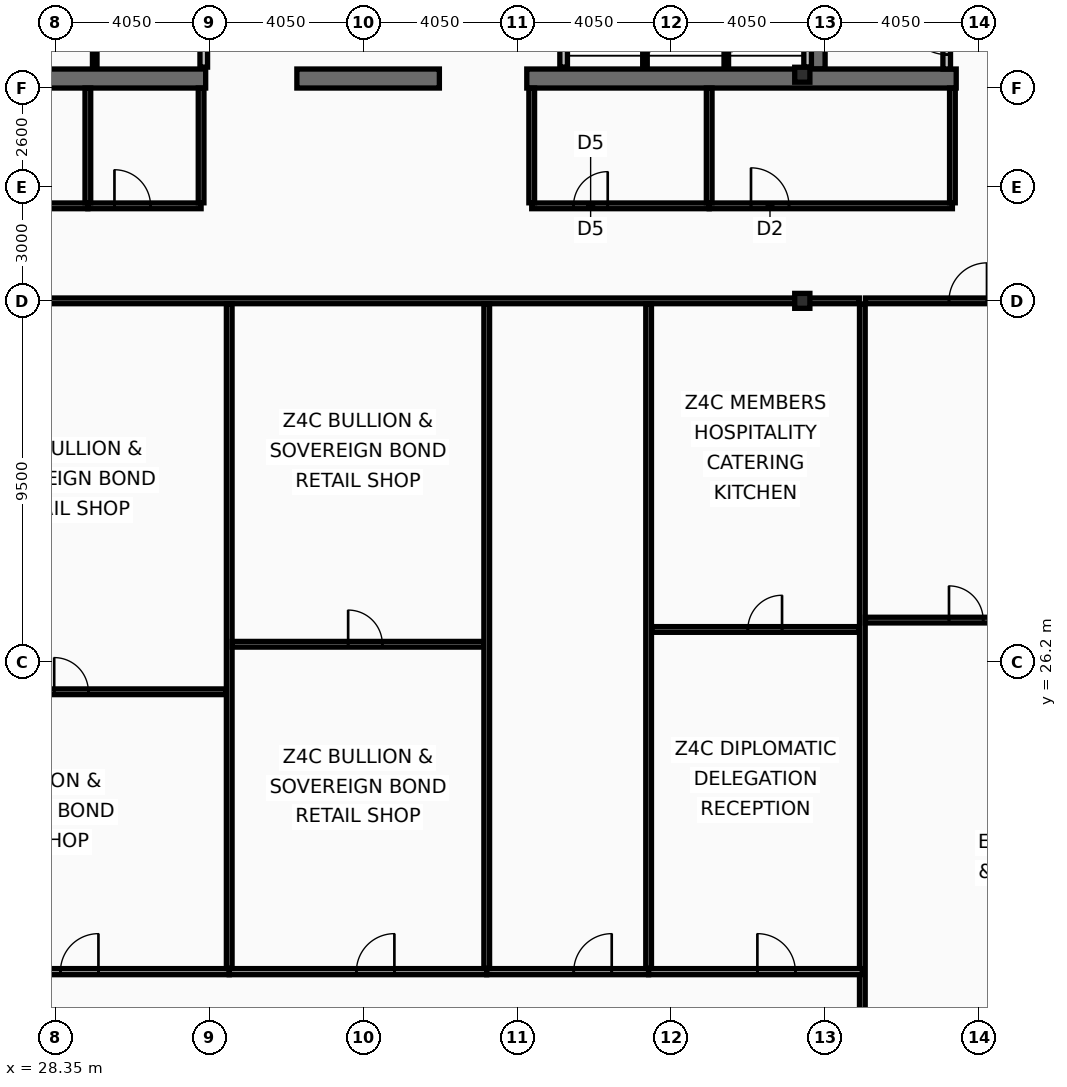
"""IFC4 building model, lengths in metres.
Left out: names, types, materials, properties, quantities, classifications, styles, units other than length and angle.
Written with IfcOpenShell. Run it as: python <this file> out.ifc"""

import sys

from ifc_helpers import new_model, si_unit, direction, frame, frame_2d, origin, origin_2d, place, context, subcontext, project, spatial, rectangle, i_section, extrude, element, fill, save


model = new_model("IFC4")
c1 = context("Model", 3, precision=1e-05, world=origin(), true_north=direction((0.0, 1.0)))
c2 = subcontext(c1, "Body", "Model", "MODEL_VIEW")
j1 = project(units=[si_unit("LENGTHUNIT", "METRE"), si_unit("PLANEANGLEUNIT", "RADIAN")], contexts=[c1])
p1 = place(None, origin())
s1 = spatial("IfcSite", under=j1, at=p1, CompositionType="ELEMENT")
p2 = place(p1, origin())
s2 = spatial("IfcBuilding", under=s1, at=p2, CompositionType="ELEMENT")
p3 = place(p2, frame((0.0, 0.0, 343.4)))
s3 = spatial("IfcBuildingStorey", under=s2, at=p3, CompositionType="ELEMENT", Elevation=343.4)
p4 = place(p3, frame((48.4, 41.8, 0.0), z_axis=(0.0, 0.0, 1.0), x_axis=(0.0, 1.0, 0.0)))
e1 = element("IfcWall", 1, at=p4, inside=s3, PredefinedType="SHEAR", context=c2, shape_type="SweptSolid", body=[
    extrude(rectangle(XDim=11.4, YDim=0.4, at=frame_2d((5.7, 0.0))), origin(), (0.0, 0.0, 1.0), 3.44),
])
p5 = place(p3, frame((32.3, 41.55, 0.0), z_axis=(0.0, 0.0, 1.0), x_axis=(-1.0, 0.0, 0.0)))
e2 = element("IfcWall", 2, at=p5, inside=s3, PredefinedType="SHEAR", context=c2, shape_type="SweptSolid", body=[
    extrude(rectangle(XDim=11.45, YDim=0.5, at=frame_2d((5.725, 0.0))), origin(), (0.0, 0.0, 1.0), 3.44),
])
p6 = place(p3, frame((38.45, 41.55, 0.0), z_axis=(0.0, 0.0, 1.0), x_axis=(-1.0, 0.0, 0.0)))
e3 = element("IfcWall", 3, at=p6, inside=s3, PredefinedType="SHEAR", context=c2, shape_type="SweptSolid", body=[
    extrude(rectangle(XDim=3.75, YDim=0.5, at=frame_2d((1.875, 0.0))), origin(), (0.0, 0.0, 1.0), 3.44),
])
p7 = place(p3, frame((52.05, 41.55, 0.0), z_axis=(0.0, 0.0, 1.0), x_axis=(-1.0, 0.0, 0.0)))
e4 = element("IfcWall", 4, at=p7, inside=s3, PredefinedType="SHEAR", context=c2, shape_type="SweptSolid", body=[
    extrude(rectangle(XDim=11.3, YDim=0.5, at=frame_2d((5.65, 0.0))), origin(), (0.0, 0.0, 1.0), 3.44),
])
for number, where, z_axis, x_axis in (
    (5, (48.0, 35.7, 0.0), (0.0, 0.0, 1.0), (1.0, 0.0, 0.0)),
    (6, (48.0, 41.65, 0.0), (0.0, 0.0, 1.0), (1.0, 0.0, 0.0)),
):
    element("IfcColumn", number, at=place(p3, frame(where, z_axis=z_axis, x_axis=x_axis)), inside=s3, PredefinedType="COLUMN", context=c2, shape_type="SweptSolid", body=[
        extrude(i_section(OverallWidth=0.399, OverallDepth=0.393, WebThickness=0.023, FlangeThickness=0.037, at=origin_2d()), origin(), (0.0, 0.0, 1.0), 3.6),
    ])
p8 = place(p3, frame((51.8, 41.8, 0.0), z_axis=(0.0, 0.0, 1.0), x_axis=(0.0, 1.0, 0.0)))
e7 = element("IfcWall", 7, at=p8, inside=s3, PredefinedType="PARTITIONING", context=c2, shape_type="SweptSolid", body=[
    extrude(rectangle(XDim=2.695, YDim=0.2, at=frame_2d((1.348, 0.0))), origin(), (0.0, 0.0, 1.0), 3.44),
])
p9 = place(p8, frame((0.38, 0.0, 0.0)))
e8 = element("IfcOpeningElement", 8, at=p9, cuts=e7, PredefinedType="OPENING", context=c2, shape_type="SweptSolid", body=[
    extrude(rectangle(XDim=1.05, YDim=2.15, at=frame_2d((0.525, 1.075))), frame((0.0, 0.11, 0.0), z_axis=(0.0, -1.0, 0.0), x_axis=(1.0, 0.0, 0.0)), (0.0, 0.0, 1.0), 0.22),
])
p10 = place(p3, frame((32.25, 41.85, 0.0), z_axis=(0.0, 0.0, 1.0), x_axis=(0.0, 1.0, 0.0)))
e9 = element("IfcWall", 9, at=p10, inside=s3, PredefinedType="PARTITIONING", context=c2, shape_type="SweptSolid", body=[
    extrude(rectangle(XDim=2.395, YDim=0.2, at=frame_2d((1.198, 0.0))), origin(), (0.0, 0.0, 1.0), 3.44),
])
p11 = place(p3, frame((29.381, 41.85, 0.0), z_axis=(0.0, 0.0, 1.0), x_axis=(0.0, 1.0, 0.0)))
e10 = element("IfcWall", 10, at=p11, inside=s3, PredefinedType="PARTITIONING", context=c2, shape_type="SweptSolid", body=[
    extrude(rectangle(XDim=2.395, YDim=0.12, at=frame_2d((1.198, 0.0))), origin(), (0.0, 0.0, 1.0), 3.44),
])
for number, where, z_axis, x_axis in (
    (11, (41.72, 41.85, 0.0), (0.0, 0.0, 1.0), (0.0, 1.0, 0.0)),
    (12, (48.14, 41.85, 0.0), (0.0, 0.0, 1.0), (0.0, 1.0, 0.0)),
):
    element("IfcWall", number, at=place(p3, frame(where, z_axis=z_axis, x_axis=x_axis)), inside=s3, PredefinedType="PARTITIONING", context=c2, shape_type="SweptSolid", body=[
        extrude(rectangle(XDim=2.4, YDim=0.2, at=frame_2d((1.2, 0.0))), origin(), (0.0, 0.0, 1.0), 3.44),
    ])
for number, where, z_axis, x_axis in (
    (13, (43.86, 41.85, 0.0), (0.0, 0.0, 1.0), (0.0, 1.0, 0.0)),
    (14, (46.0, 41.85, 0.0), (0.0, 0.0, 1.0), (0.0, 1.0, 0.0)),
):
    element("IfcWall", number, at=place(p3, frame(where, z_axis=z_axis, x_axis=x_axis)), inside=s3, PredefinedType="PARTITIONING", context=c2, shape_type="SweptSolid", body=[
        extrude(rectangle(XDim=2.4, YDim=0.12, at=frame_2d((1.2, 0.0))), origin(), (0.0, 0.0, 1.0), 3.44),
    ])
p12 = place(p3, frame((24.7, 38.2, 0.0), z_axis=(0.0, 0.0, 1.0), x_axis=(1.0, 0.0, 0.0)))
e15 = element("IfcWall", 15, at=p12, inside=s3, PredefinedType="PARTITIONING", context=c2, shape_type="SweptSolid", body=[
    extrude(rectangle(XDim=4.5, YDim=0.15, at=frame_2d((2.25, 0.0))), origin(), (0.0, 0.0, 1.0), 2.83),
])
p13 = place(p12, frame((0.9, 0.0, 0.0)))
e16 = element("IfcOpeningElement", 16, at=p13, cuts=e15, PredefinedType="OPENING", context=c2, shape_type="SweptSolid", body=[
    extrude(rectangle(XDim=0.95, YDim=2.05, at=frame_2d((0.475, 1.025))), frame((0.0, 0.085, 0.0), z_axis=(0.0, -1.0, 0.0), x_axis=(1.0, 0.0, 0.0)), (0.0, 0.0, 1.0), 0.17),
])
p14 = place(p3, frame((29.2, 38.2, 0.0), z_axis=(0.0, 0.0, 1.0), x_axis=(1.0, 0.0, 0.0)))
e17 = element("IfcWall", 17, at=p14, inside=s3, PredefinedType="PARTITIONING", context=c2, shape_type="SweptSolid", body=[
    extrude(rectangle(XDim=2.98, YDim=0.15, at=frame_2d((1.49, 0.0))), origin(), (0.0, 0.0, 1.0), 3.44),
])
p15 = place(p14, frame((0.7, 0.0, 0.0)))
e18 = element("IfcOpeningElement", 18, at=p15, cuts=e17, PredefinedType="OPENING", context=c2, shape_type="SweptSolid", body=[
    extrude(rectangle(XDim=0.95, YDim=2.05, at=frame_2d((0.475, 1.025))), frame((0.0, 0.085, 0.0), z_axis=(0.0, -1.0, 0.0), x_axis=(1.0, 0.0, 0.0)), (0.0, 0.0, 1.0), 0.17),
])
for number, where, z_axis, x_axis in (
    (19, (29.2, 38.28, 0.0), (0.0, 0.0, 1.0), (0.0, 1.0, 0.0)),
    (20, (32.18, 38.28, 0.0), (0.0, 0.0, 1.0), (0.0, 1.0, 0.0)),
):
    element("IfcWall", number, at=place(p3, frame(where, z_axis=z_axis, x_axis=x_axis)), inside=s3, PredefinedType="PARTITIONING", context=c2, shape_type="SweptSolid", body=[
        extrude(rectangle(XDim=3.02, YDim=0.15, at=frame_2d((1.51, 0.0))), origin(), (0.0, 0.0, 1.0), 3.44),
    ])
p16 = place(p3, frame((40.88, 38.2, 0.0), z_axis=(0.0, 0.0, 1.0), x_axis=(1.0, 0.0, 0.0)))
e21 = element("IfcWall", 21, at=p16, inside=s3, PredefinedType="PARTITIONING", context=c2, shape_type="SweptSolid", body=[
    extrude(rectangle(XDim=4.67, YDim=0.15, at=frame_2d((2.335, 0.0))), origin(), (0.0, 0.0, 1.0), 3.44),
])
p17 = place(p16, frame((1.1, 0.0, 0.0)))
e22 = element("IfcOpeningElement", 22, at=p17, cuts=e21, PredefinedType="OPENING", context=c2, shape_type="SweptSolid", body=[
    extrude(rectangle(XDim=0.9, YDim=2.05, at=frame_2d((0.45, 1.025))), frame((0.0, 0.085, 0.0), z_axis=(0.0, -1.0, 0.0), x_axis=(1.0, 0.0, 0.0)), (0.0, 0.0, 1.0), 0.17),
])
p18 = place(p3, frame((45.55, 38.2, 0.0), z_axis=(0.0, 0.0, 1.0), x_axis=(1.0, 0.0, 0.0)))
e23 = element("IfcWall", 23, at=p18, inside=s3, PredefinedType="PARTITIONING", context=c2, shape_type="SweptSolid", body=[
    extrude(rectangle(XDim=6.4, YDim=0.15, at=frame_2d((3.2, 0.0))), origin(), (0.0, 0.0, 1.0), 2.83),
])
p19 = place(p18, frame((1.1, 0.0, 0.0)))
e24 = element("IfcOpeningElement", 24, at=p19, cuts=e23, PredefinedType="OPENING", context=c2, shape_type="SweptSolid", body=[
    extrude(rectangle(XDim=1.0, YDim=2.05, at=frame_2d((0.5, 1.025))), frame((0.0, 0.085, 0.0), z_axis=(0.0, -1.0, 0.0), x_axis=(1.0, 0.0, 0.0)), (0.0, 0.0, 1.0), 0.17),
])
for number, where, z_axis, x_axis in (
    (25, (40.88, 38.28, 0.0), (0.0, 0.0, 1.0), (0.0, 1.0, 0.0)),
    (26, (45.55, 38.28, 0.0), (0.0, 0.0, 1.0), (0.0, 1.0, 0.0)),
    (27, (51.95, 38.28, 0.0), (0.0, 0.0, 1.0), (0.0, 1.0, 0.0)),
):
    element("IfcWall", number, at=place(p3, frame(where, z_axis=z_axis, x_axis=x_axis)), inside=s3, PredefinedType="PARTITIONING", context=c2, shape_type="SweptSolid", body=[
        extrude(rectangle(XDim=3.02, YDim=0.15, at=frame_2d((1.51, 0.0))), origin(), (0.0, 0.0, 1.0), 3.44),
    ])
p20 = place(p3, frame((49.58, 10.665, 0.0), z_axis=(0.0, 0.0, 1.0), x_axis=(0.0, 1.0, 0.0)))
e28 = element("IfcWall", 28, at=p20, inside=s3, PredefinedType="PARTITIONING", context=c2, shape_type="SweptSolid", body=[
    extrude(rectangle(XDim=24.955, YDim=0.15, at=frame_2d((12.478, 0.0))), origin(), (0.0, 0.0, 1.0), 3.07),
])
p21 = place(p20, frame((3.2, 0.0, 0.0)))
e29 = element("IfcOpeningElement", 29, at=p21, cuts=e28, PredefinedType="OPENING", context=c2, shape_type="SweptSolid", body=[
    extrude(rectangle(XDim=1.1, YDim=2.1, at=frame_2d((0.55, 1.05))), frame((0.0, 0.085, 0.0), z_axis=(0.0, -1.0, 0.0), x_axis=(1.0, 0.0, 0.0)), (0.0, 0.0, 1.0), 0.17),
])
p22 = place(p3, frame((24.48, 35.7, 0.0), z_axis=(0.0, 0.0, 1.0), x_axis=(1.0, 0.0, 0.0)))
e30 = element("IfcWall", 30, at=p22, inside=s3, PredefinedType="PARTITIONING", context=c2, shape_type="SweptSolid", body=[
    extrude(rectangle(XDim=25.02, YDim=0.15, at=frame_2d((12.51, 0.0))), origin(), (0.0, 0.0, 1.0), 2.83),
])
p23 = place(p3, frame((49.66, 35.7, 0.0), z_axis=(0.0, 0.0, 1.0), x_axis=(1.0, 0.0, 0.0)))
e31 = element("IfcWall", 31, at=p23, inside=s3, PredefinedType="PARTITIONING", context=c2, shape_type="SweptSolid", body=[
    extrude(rectangle(XDim=11.145, YDim=0.15, at=frame_2d((5.573, 0.0))), origin(), (0.0, 0.0, 1.0), 2.83),
])
p24 = place(p23, frame((2.2, 0.0, 0.0)))
e32 = element("IfcOpeningElement", 32, at=p24, cuts=e31, PredefinedType="OPENING", context=c2, shape_type="SweptSolid", body=[
    extrude(rectangle(XDim=1.0, YDim=2.05, at=frame_2d((0.5, 1.025))), frame((0.0, 0.085, 0.0), z_axis=(0.0, -1.0, 0.0), x_axis=(1.0, 0.0, 0.0)), (0.0, 0.0, 1.0), 0.17),
])
p25 = place(p3, frame((49.66, 27.3, 0.0), z_axis=(0.0, 0.0, 1.0), x_axis=(1.0, 0.0, 0.0)))
e33 = element("IfcWall", 33, at=p25, inside=s3, PredefinedType="PARTITIONING", context=c2, shape_type="SweptSolid", body=[
    extrude(rectangle(XDim=11.145, YDim=0.15, at=frame_2d((5.573, 0.0))), origin(), (0.0, 0.0, 1.0), 2.83),
])
p26 = place(p25, frame((2.2, 0.0, 0.0)))
e34 = element("IfcOpeningElement", 34, at=p26, cuts=e33, PredefinedType="OPENING", context=c2, shape_type="SweptSolid", body=[
    extrude(rectangle(XDim=0.9, YDim=2.05, at=frame_2d((0.45, 1.025))), frame((0.0, 0.085, 0.0), z_axis=(0.0, -1.0, 0.0), x_axis=(1.0, 0.0, 0.0)), (0.0, 0.0, 1.0), 0.17),
])
p27 = place(p3, frame((24.4, 18.05, 0.0), z_axis=(0.0, 0.0, 1.0), x_axis=(1.0, 0.0, 0.0)))
e35 = element("IfcWall", 35, at=p27, inside=s3, PredefinedType="PARTITIONING", context=c2, shape_type="SweptSolid", body=[
    extrude(rectangle(XDim=8.52, YDim=0.16, at=frame_2d((4.26, 0.0))), origin(), (0.0, 0.0, 1.0), 2.83),
])
p28 = place(p27, frame((4.078, 0.0, 0.0)))
e36 = element("IfcOpeningElement", 36, at=p28, cuts=e35, PredefinedType="OPENING", context=c2, shape_type="SweptSolid", body=[
    extrude(rectangle(XDim=1.0, YDim=2.05, at=frame_2d((0.5, 1.025))), frame((0.0, 0.09, 0.0), z_axis=(0.0, -1.0, 0.0), x_axis=(1.0, 0.0, 0.0)), (0.0, 0.0, 1.0), 0.18),
])
p29 = place(p3, frame((24.48, 25.414, 0.0), z_axis=(0.0, 0.0, 1.0), x_axis=(1.0, 0.0, 0.0)))
e37 = element("IfcWall", 37, at=p29, inside=s3, PredefinedType="PARTITIONING", context=c2, shape_type="SweptSolid", body=[
    extrude(rectangle(XDim=8.36, YDim=0.15, at=frame_2d((4.18, 0.0))), origin(), (0.0, 0.0, 1.0), 2.83),
])
p30 = place(p29, frame((3.834, 0.0, 0.0)))
e38 = element("IfcOpeningElement", 38, at=p30, cuts=e37, PredefinedType="OPENING", context=c2, shape_type="SweptSolid", body=[
    extrude(rectangle(XDim=0.9, YDim=2.05, at=frame_2d((0.45, 1.025))), frame((0.0, 0.085, 0.0), z_axis=(0.0, -1.0, 0.0), x_axis=(1.0, 0.0, 0.0)), (0.0, 0.0, 1.0), 0.17),
])
p31 = place(p3, frame((32.92, 18.05, 0.0), z_axis=(0.0, 0.0, 1.0), x_axis=(1.0, 0.0, 0.0)))
e39 = element("IfcWall", 39, at=p31, inside=s3, PredefinedType="PARTITIONING", context=c2, shape_type="SweptSolid", body=[
    extrude(rectangle(XDim=6.776, YDim=0.16, at=frame_2d((3.388, 0.0))), origin(), (0.0, 0.0, 1.0), 3.44),
])
p32 = place(p31, frame((3.346, 0.0, 0.0)))
e40 = element("IfcOpeningElement", 40, at=p32, cuts=e39, PredefinedType="OPENING", context=c2, shape_type="SweptSolid", body=[
    extrude(rectangle(XDim=1.0, YDim=2.05, at=frame_2d((0.5, 1.025))), frame((0.0, 0.09, 0.0), z_axis=(0.0, -1.0, 0.0), x_axis=(1.0, 0.0, 0.0)), (0.0, 0.0, 1.0), 0.18),
])
p33 = place(p3, frame((32.92, 18.135, 0.0), z_axis=(0.0, 0.0, 1.0), x_axis=(0.0, 1.0, 0.0)))
e41 = element("IfcWall", 41, at=p33, inside=s3, PredefinedType="PARTITIONING", context=c2, shape_type="SweptSolid", body=[
    extrude(rectangle(XDim=17.485, YDim=0.15, at=frame_2d((8.743, 0.0))), origin(), (0.0, 0.0, 1.0), 3.07),
])
p34 = place(p3, frame((33.0, 26.664, 0.0), z_axis=(0.0, 0.0, 1.0), x_axis=(1.0, 0.0, 0.0)))
e42 = element("IfcWall", 42, at=p34, inside=s3, PredefinedType="PARTITIONING", context=c2, shape_type="SweptSolid", body=[
    extrude(rectangle(XDim=6.616, YDim=0.15, at=frame_2d((3.308, 0.0))), origin(), (0.0, 0.0, 1.0), 3.44),
])
p35 = place(p34, frame((3.049, 0.0, 0.0)))
e43 = element("IfcOpeningElement", 43, at=p35, cuts=e42, PredefinedType="OPENING", context=c2, shape_type="SweptSolid", body=[
    extrude(rectangle(XDim=0.9, YDim=2.05, at=frame_2d((0.45, 1.025))), frame((0.0, 0.085, 0.0), z_axis=(0.0, -1.0, 0.0), x_axis=(1.0, 0.0, 0.0)), (0.0, 0.0, 1.0), 0.17),
])
p36 = place(p3, frame((39.696, 18.05, 0.0), z_axis=(0.0, 0.0, 1.0), x_axis=(1.0, 0.0, 0.0)))
e44 = element("IfcWall", 44, at=p36, inside=s3, PredefinedType="PARTITIONING", context=c2, shape_type="SweptSolid", body=[
    extrude(rectangle(XDim=4.26, YDim=0.16, at=frame_2d((2.13, 0.0))), origin(), (0.0, 0.0, 1.0), 3.44),
])
p37 = place(p36, frame((2.289, 0.0, 0.0)))
e45 = element("IfcOpeningElement", 45, at=p37, cuts=e44, PredefinedType="OPENING", context=c2, shape_type="SweptSolid", body=[
    extrude(rectangle(XDim=1.0, YDim=2.05, at=frame_2d((0.5, 1.025))), frame((0.0, 0.09, 0.0), z_axis=(0.0, -1.0, 0.0), x_axis=(1.0, 0.0, 0.0)), (0.0, 0.0, 1.0), 0.18),
])
p38 = place(p3, frame((39.696, 18.135, 0.0), z_axis=(0.0, 0.0, 1.0), x_axis=(0.0, 1.0, 0.0)))
e46 = element("IfcWall", 46, at=p38, inside=s3, PredefinedType="PARTITIONING", context=c2, shape_type="SweptSolid", body=[
    extrude(rectangle(XDim=17.485, YDim=0.15, at=frame_2d((8.743, 0.0))), origin(), (0.0, 0.0, 1.0), 3.07),
])
p39 = place(p3, frame((43.956, 18.05, 0.0), z_axis=(0.0, 0.0, 1.0), x_axis=(1.0, 0.0, 0.0)))
e47 = element("IfcWall", 47, at=p39, inside=s3, PredefinedType="PARTITIONING", context=c2, shape_type="SweptSolid", body=[
    extrude(rectangle(XDim=5.624, YDim=0.16, at=frame_2d((2.812, 0.0))), origin(), (0.0, 0.0, 1.0), 2.83),
])
p40 = place(p39, frame((2.862, 0.0, 0.0)))
e48 = element("IfcOpeningElement", 48, at=p40, cuts=e47, PredefinedType="OPENING", context=c2, shape_type="SweptSolid", body=[
    extrude(rectangle(XDim=1.0, YDim=2.05, at=frame_2d((0.5, 1.025))), frame((0.0, 0.09, 0.0), z_axis=(0.0, -1.0, 0.0), x_axis=(1.0, 0.0, 0.0)), (0.0, 0.0, 1.0), 0.18),
])
p41 = place(p3, frame((43.956, 18.135, 0.0), z_axis=(0.0, 0.0, 1.0), x_axis=(0.0, 1.0, 0.0)))
e49 = element("IfcWall", 49, at=p41, inside=s3, PredefinedType="PARTITIONING", context=c2, shape_type="SweptSolid", body=[
    extrude(rectangle(XDim=17.485, YDim=0.15, at=frame_2d((8.743, 0.0))), origin(), (0.0, 0.0, 1.0), 3.07),
])
p42 = place(p3, frame((44.036, 27.054, 0.0), z_axis=(0.0, 0.0, 1.0), x_axis=(1.0, 0.0, 0.0)))
e50 = element("IfcWall", 50, at=p42, inside=s3, PredefinedType="PARTITIONING", context=c2, shape_type="SweptSolid", body=[
    extrude(rectangle(XDim=5.464, YDim=0.15, at=frame_2d((2.732, 0.0))), origin(), (0.0, 0.0, 1.0), 2.83),
])
p43 = place(p42, frame((2.531, 0.0, 0.0)))
e51 = element("IfcOpeningElement", 51, at=p43, cuts=e50, PredefinedType="OPENING", context=c2, shape_type="SweptSolid", body=[
    extrude(rectangle(XDim=0.9, YDim=2.05, at=frame_2d((0.45, 1.025))), frame((0.0, 0.085, 0.0), z_axis=(0.0, -1.0, 0.0), x_axis=(1.0, 0.0, 0.0)), (0.0, 0.0, 1.0), 0.17),
])
p44 = place(p9, origin())
e52 = element("IfcDoor", 52, at=p44, inside=s3, OperationType="SINGLE_SWING_RIGHT", PredefinedType="DOOR", context=c2, shape_type="SweptSolid", body=[
    extrude(rectangle(XDim=1.05, YDim=2.15, at=frame_2d((0.525, 1.075))), frame((0.0, 0.025, 0.0), z_axis=(0.0, -1.0, 0.0), x_axis=(1.0, 0.0, 0.0)), (0.0, 0.0, 1.0), 0.05),
])
fill(e8, e52)
p45 = place(p15, origin())
e53 = element("IfcDoor", 53, at=p45, inside=s3, OperationType="SINGLE_SWING_LEFT", PredefinedType="DOOR", context=c2, shape_type="SweptSolid", body=[
    extrude(rectangle(XDim=0.95, YDim=2.05, at=frame_2d((0.475, 1.025))), frame((0.0, 0.025, 0.0), z_axis=(0.0, -1.0, 0.0), x_axis=(1.0, 0.0, 0.0)), (0.0, 0.0, 1.0), 0.05),
])
fill(e18, e53)
p46 = place(p17, origin())
e54 = element("IfcDoor", 54, at=p46, inside=s3, OperationType="SINGLE_SWING_RIGHT", PredefinedType="DOOR", context=c2, shape_type="SweptSolid", body=[
    extrude(rectangle(XDim=0.9, YDim=2.05, at=frame_2d((0.45, 1.025))), frame((0.0, 0.025, 0.0), z_axis=(0.0, -1.0, 0.0), x_axis=(1.0, 0.0, 0.0)), (0.0, 0.0, 1.0), 0.05),
])
fill(e22, e54)
p47 = place(p19, origin())
e55 = element("IfcDoor", 55, at=p47, inside=s3, OperationType="SINGLE_SWING_LEFT", PredefinedType="DOOR", context=c2, shape_type="SweptSolid", body=[
    extrude(rectangle(XDim=1.0, YDim=2.05, at=frame_2d((0.5, 1.025))), frame((0.0, 0.025, 0.0), z_axis=(0.0, -1.0, 0.0), x_axis=(1.0, 0.0, 0.0)), (0.0, 0.0, 1.0), 0.05),
])
fill(e24, e55)
p48 = place(p24, origin())
e56 = element("IfcDoor", 56, at=p48, inside=s3, OperationType="SINGLE_SWING_RIGHT", PredefinedType="DOOR", context=c2, shape_type="SweptSolid", body=[
    extrude(rectangle(XDim=1.0, YDim=2.05, at=frame_2d((0.5, 1.025))), frame((0.0, 0.025, 0.0), z_axis=(0.0, -1.0, 0.0), x_axis=(1.0, 0.0, 0.0)), (0.0, 0.0, 1.0), 0.05),
])
fill(e32, e56)
p49 = place(p26, origin())
e57 = element("IfcDoor", 57, at=p49, inside=s3, OperationType="SINGLE_SWING_LEFT", PredefinedType="DOOR", context=c2, shape_type="SweptSolid", body=[
    extrude(rectangle(XDim=0.9, YDim=2.05, at=frame_2d((0.45, 1.025))), frame((0.0, 0.025, 0.0), z_axis=(0.0, -1.0, 0.0), x_axis=(1.0, 0.0, 0.0)), (0.0, 0.0, 1.0), 0.05),
])
fill(e34, e57)
p50 = place(p28, origin())
e58 = element("IfcDoor", 58, at=p50, inside=s3, OperationType="SINGLE_SWING_RIGHT", PredefinedType="DOOR", context=c2, shape_type="SweptSolid", body=[
    extrude(rectangle(XDim=1.0, YDim=2.05, at=frame_2d((0.5, 1.025))), frame((0.0, 0.025, 0.0), z_axis=(0.0, -1.0, 0.0), x_axis=(1.0, 0.0, 0.0)), (0.0, 0.0, 1.0), 0.05),
])
fill(e36, e58)
p51 = place(p30, origin())
e59 = element("IfcDoor", 59, at=p51, inside=s3, OperationType="SINGLE_SWING_LEFT", PredefinedType="DOOR", context=c2, shape_type="SweptSolid", body=[
    extrude(rectangle(XDim=0.9, YDim=2.05, at=frame_2d((0.45, 1.025))), frame((0.0, 0.025, 0.0), z_axis=(0.0, -1.0, 0.0), x_axis=(1.0, 0.0, 0.0)), (0.0, 0.0, 1.0), 0.05),
])
fill(e38, e59)
p52 = place(p32, origin())
e60 = element("IfcDoor", 60, at=p52, inside=s3, OperationType="SINGLE_SWING_RIGHT", PredefinedType="DOOR", context=c2, shape_type="SweptSolid", body=[
    extrude(rectangle(XDim=1.0, YDim=2.05, at=frame_2d((0.5, 1.025))), frame((0.0, 0.025, 0.0), z_axis=(0.0, -1.0, 0.0), x_axis=(1.0, 0.0, 0.0)), (0.0, 0.0, 1.0), 0.05),
])
fill(e40, e60)
p53 = place(p35, origin())
e61 = element("IfcDoor", 61, at=p53, inside=s3, OperationType="SINGLE_SWING_LEFT", PredefinedType="DOOR", context=c2, shape_type="SweptSolid", body=[
    extrude(rectangle(XDim=0.9, YDim=2.05, at=frame_2d((0.45, 1.025))), frame((0.0, 0.025, 0.0), z_axis=(0.0, -1.0, 0.0), x_axis=(1.0, 0.0, 0.0)), (0.0, 0.0, 1.0), 0.05),
])
fill(e43, e61)
p54 = place(p37, origin())
e62 = element("IfcDoor", 62, at=p54, inside=s3, OperationType="SINGLE_SWING_RIGHT", PredefinedType="DOOR", context=c2, shape_type="SweptSolid", body=[
    extrude(rectangle(XDim=1.0, YDim=2.05, at=frame_2d((0.5, 1.025))), frame((0.0, 0.025, 0.0), z_axis=(0.0, -1.0, 0.0), x_axis=(1.0, 0.0, 0.0)), (0.0, 0.0, 1.0), 0.05),
])
fill(e45, e62)
p55 = place(p40, origin())
e63 = element("IfcDoor", 63, at=p55, inside=s3, OperationType="SINGLE_SWING_LEFT", PredefinedType="DOOR", context=c2, shape_type="SweptSolid", body=[
    extrude(rectangle(XDim=1.0, YDim=2.05, at=frame_2d((0.5, 1.025))), frame((0.0, 0.025, 0.0), z_axis=(0.0, -1.0, 0.0), x_axis=(1.0, 0.0, 0.0)), (0.0, 0.0, 1.0), 0.05),
])
fill(e48, e63)
p56 = place(p43, origin())
e64 = element("IfcDoor", 64, at=p56, inside=s3, OperationType="SINGLE_SWING_RIGHT", PredefinedType="DOOR", context=c2, shape_type="SweptSolid", body=[
    extrude(rectangle(XDim=0.9, YDim=2.05, at=frame_2d((0.45, 1.025))), frame((0.0, 0.025, 0.0), z_axis=(0.0, -1.0, 0.0), x_axis=(1.0, 0.0, 0.0)), (0.0, 0.0, 1.0), 0.05),
])
fill(e51, e64)
save(model, sys.argv[1])
